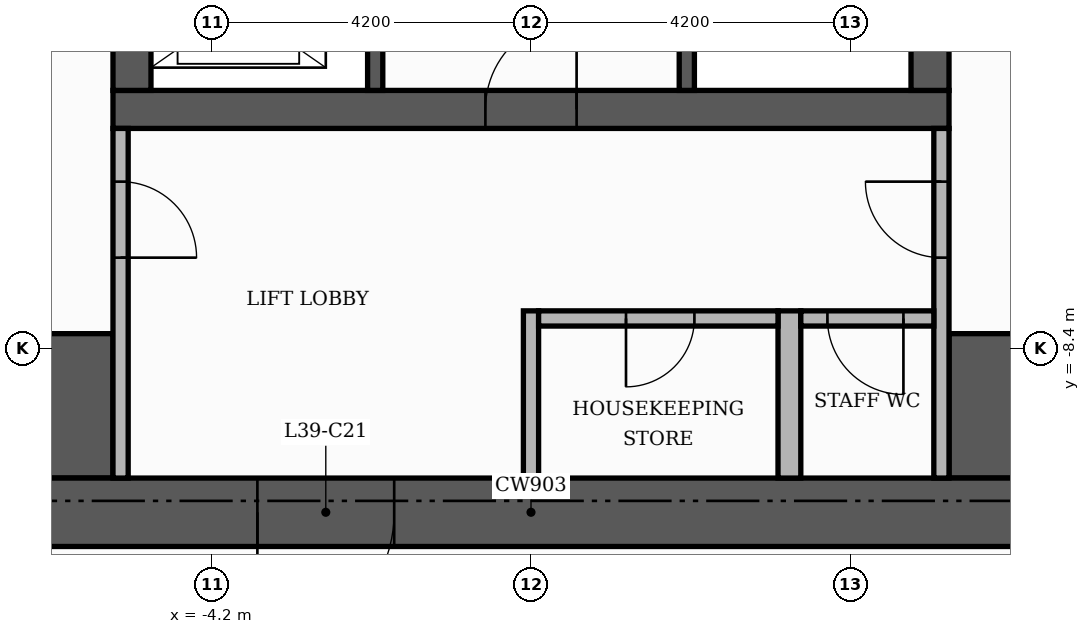
"""IFC4 building model, lengths in metres.
Left out: names, types, materials, properties, quantities, classifications, styles, units other than length and angle.
Written with IfcOpenShell. Run it as: python <this file> out.ifc"""

import sys

from ifc_helpers import new_model, si_unit, direction, frame, frame_2d, origin, place, context, subcontext, project, spatial, rectangle, extrude, element, fill, save


model = new_model("IFC4")
c1 = context("Model", 3, precision=1e-05, world=origin(), true_north=direction((0.0, 1.0)))
c2 = subcontext(c1, "Body", "Model", "MODEL_VIEW")
j1 = project(units=[si_unit("LENGTHUNIT", "METRE"), si_unit("PLANEANGLEUNIT", "RADIAN")], contexts=[c1])
p1 = place(None, origin())
s1 = spatial("IfcSite", under=j1, at=p1, CompositionType="ELEMENT")
p2 = place(p1, origin())
s2 = spatial("IfcBuilding", under=s1, at=p2, CompositionType="ELEMENT")
p3 = place(p2, frame((0.0, 0.0, 165.0)))
s3 = spatial("IfcBuildingStorey", under=s2, at=p3, CompositionType="ELEMENT", Elevation=165.0)
p4 = place(p3, frame((-5.5, -5.25, 0.0), z_axis=(0.0, 0.0, 1.0), x_axis=(1.0, 0.0, 0.0)))
e1 = element("IfcWall", 1, at=p4, inside=s3, PredefinedType="SHEAR", context=c2, shape_type="SweptSolid", body=[
    extrude(rectangle(XDim=11.0, YDim=0.5, at=frame_2d((5.5, 0.0))), origin(), (0.0, 0.0, 1.0), 3.48),
])
p5 = place(p4, frame((4.9, 0.0, 0.0)))
e2 = element("IfcOpeningElement", 2, at=p5, cuts=e1, PredefinedType="OPENING", context=c2, shape_type="SweptSolid", body=[
    extrude(rectangle(XDim=1.2, YDim=2.1, at=frame_2d((0.6, 1.05))), frame((0.0, 0.26, 0.0), z_axis=(0.0, -1.0, 0.0), x_axis=(1.0, 0.0, 0.0)), (0.0, 0.0, 1.0), 0.52),
])
for number, where, z_axis, x_axis in (
    (3, (-5.25, -5.0, 0.0), (0.0, 0.0, 1.0), (0.0, 1.0, 0.0)),
    (4, (5.25, -5.0, 0.0), (0.0, 0.0, 1.0), (0.0, 1.0, 0.0)),
):
    element("IfcWall", number, at=place(p3, frame(where, z_axis=z_axis, x_axis=x_axis)), inside=s3, PredefinedType="SHEAR", context=c2, shape_type="SweptSolid", body=[
        extrude(rectangle(XDim=10.5, YDim=0.5, at=frame_2d((5.25, 0.0))), origin(), (0.0, 0.0, 1.0), 3.48),
    ])
for number, where, z_axis, x_axis in (
    (5, (-10.1, -9.15, 0.0), (0.0, 0.0, 1.0), (1.0, 0.0, 0.0)),
    (6, (5.5, -9.15, 0.0), (0.0, 0.0, 1.0), (1.0, 0.0, 0.0)),
):
    element("IfcWall", number, at=place(p3, frame(where, z_axis=z_axis, x_axis=x_axis)), inside=s3, PredefinedType="SHEAR", context=c2, shape_type="SweptSolid", body=[
        extrude(rectangle(XDim=4.6, YDim=1.9, at=frame_2d((2.3, 0.0))), origin(), (0.0, 0.0, 1.0), 3.48),
    ])
p6 = place(p3, frame((2.05, -5.0, 0.0), z_axis=(0.0, 0.0, 1.0), x_axis=(0.0, 1.0, 0.0)))
e7 = element("IfcWall", 7, at=p6, inside=s3, PredefinedType="SHEAR", context=c2, shape_type="SweptSolid", body=[
    extrude(rectangle(XDim=6.6, YDim=0.2, at=frame_2d((3.3, 0.0))), origin(), (0.0, 0.0, 1.0), 3.48),
])
p7 = place(p6, frame((5.25, 0.0, 0.0)))
e8 = element("IfcOpeningElement", 8, at=p7, cuts=e7, PredefinedType="OPENING", context=c2, shape_type="SweptSolid", body=[
    extrude(rectangle(XDim=1.0, YDim=2.1, at=frame_2d((0.5, 1.05))), frame((0.0, 0.11, 0.0), z_axis=(0.0, -1.0, 0.0), x_axis=(1.0, 0.0, 0.0)), (0.0, 0.0, 1.0), 0.22),
])
p8 = place(p3, frame((-2.05, -5.0, 0.0), z_axis=(0.0, 0.0, 1.0), x_axis=(0.0, 1.0, 0.0)))
e9 = element("IfcWall", 9, at=p8, inside=s3, PredefinedType="SHEAR", context=c2, shape_type="SweptSolid", body=[
    extrude(rectangle(XDim=3.4, YDim=0.2, at=frame_2d((1.7, 0.0))), origin(), (0.0, 0.0, 1.0), 3.48),
])
p9 = place(p8, frame((0.55, 0.0, 0.0)))
e10 = element("IfcOpeningElement", 10, at=p9, cuts=e9, PredefinedType="OPENING", context=c2, shape_type="SweptSolid", body=[
    extrude(rectangle(XDim=1.1, YDim=2.1, at=frame_2d((0.55, 1.05))), frame((0.0, 0.11, 0.0), z_axis=(0.0, -1.0, 0.0), x_axis=(1.0, 0.0, 0.0)), (0.0, 0.0, 1.0), 0.22),
])
p10 = place(p8, frame((2.45, 0.0, 0.0)))
e11 = element("IfcOpeningElement", 11, at=p10, cuts=e9, PredefinedType="OPENING", context=c2, shape_type="SweptSolid", body=[
    extrude(rectangle(XDim=0.8, YDim=2.1, at=frame_2d((0.4, 1.05))), frame((0.0, 0.11, 0.0), z_axis=(0.0, -1.0, 0.0), x_axis=(1.0, 0.0, 0.0)), (0.0, 0.0, 1.0), 0.22),
])
p11 = place(p3, frame((-11.0, -10.55, 0.0), z_axis=(0.0, 0.0, 1.0), x_axis=(1.0, 0.0, 0.0)))
e12 = element("IfcWall", 12, at=p11, inside=s3, PredefinedType="SHEAR", context=c2, shape_type="SweptSolid", body=[
    extrude(rectangle(XDim=22.0, YDim=0.9, at=frame_2d((11.0, 0.0))), origin(), (0.0, 0.0, 1.0), 3.48),
])
p12 = place(p11, frame((7.4, 0.0, 0.0)))
e13 = element("IfcOpeningElement", 13, at=p12, cuts=e12, PredefinedType="OPENING", context=c2, shape_type="SweptSolid", body=[
    extrude(rectangle(XDim=1.8, YDim=2.2, at=frame_2d((0.9, 1.1))), frame((0.0, 0.46, 0.0), z_axis=(0.0, -1.0, 0.0), x_axis=(1.0, 0.0, 0.0)), (0.0, 0.0, 1.0), 0.92),
])
p13 = place(p3, frame((-5.4, -10.1, 0.0), z_axis=(0.0, 0.0, 1.0), x_axis=(0.0, 1.0, 0.0)))
e14 = element("IfcWall", 14, at=p13, inside=s3, PredefinedType="PARTITIONING", context=c2, shape_type="SweptSolid", body=[
    extrude(rectangle(XDim=4.6, YDim=0.2, at=frame_2d((2.3, 0.0))), origin(), (0.0, 0.0, 1.0), 3.48),
])
p14 = place(p13, frame((2.9, 0.0, 0.0)))
e15 = element("IfcOpeningElement", 15, at=p14, cuts=e14, PredefinedType="OPENING", context=c2, shape_type="SweptSolid", body=[
    extrude(rectangle(XDim=1.0, YDim=2.1, at=frame_2d((0.5, 1.05))), frame((0.0, 0.11, 0.0), z_axis=(0.0, -1.0, 0.0), x_axis=(1.0, 0.0, 0.0)), (0.0, 0.0, 1.0), 0.22),
])
p15 = place(p3, frame((0.0, -10.1, 0.0), z_axis=(0.0, 0.0, 1.0), x_axis=(0.0, 1.0, 0.0)))
e16 = element("IfcWall", 16, at=p15, inside=s3, PredefinedType="PARTITIONING", context=c2, shape_type="SweptSolid", body=[
    extrude(rectangle(XDim=2.2, YDim=0.2, at=frame_2d((1.1, 0.0))), origin(), (0.0, 0.0, 1.0), 3.48),
])
p16 = place(p3, frame((3.4, -10.1, 0.0), z_axis=(0.0, 0.0, 1.0), x_axis=(0.0, 1.0, 0.0)))
e17 = element("IfcWall", 17, at=p16, inside=s3, PredefinedType="PARTITIONING", context=c2, shape_type="SweptSolid", body=[
    extrude(rectangle(XDim=2.2, YDim=0.3, at=frame_2d((1.1, 0.0))), origin(), (0.0, 0.0, 1.0), 3.48),
])
p17 = place(p3, frame((5.4, -10.1, 0.0), z_axis=(0.0, 0.0, 1.0), x_axis=(0.0, 1.0, 0.0)))
e18 = element("IfcWall", 18, at=p17, inside=s3, PredefinedType="PARTITIONING", context=c2, shape_type="SweptSolid", body=[
    extrude(rectangle(XDim=4.6, YDim=0.2, at=frame_2d((2.3, 0.0))), origin(), (0.0, 0.0, 1.0), 3.48),
])
p18 = place(p17, frame((2.9, 0.0, 0.0)))
e19 = element("IfcOpeningElement", 19, at=p18, cuts=e18, PredefinedType="OPENING", context=c2, shape_type="SweptSolid", body=[
    extrude(rectangle(XDim=1.0, YDim=2.1, at=frame_2d((0.5, 1.05))), frame((0.0, 0.11, 0.0), z_axis=(0.0, -1.0, 0.0), x_axis=(1.0, 0.0, 0.0)), (0.0, 0.0, 1.0), 0.22),
])
p19 = place(p3, frame((0.1, -8.0, 0.0), z_axis=(0.0, 0.0, 1.0), x_axis=(1.0, 0.0, 0.0)))
e20 = element("IfcWall", 20, at=p19, inside=s3, PredefinedType="PARTITIONING", context=c2, shape_type="SweptSolid", body=[
    extrude(rectangle(XDim=3.15, YDim=0.2, at=frame_2d((1.575, 0.0))), origin(), (0.0, 0.0, 1.0), 3.48),
])
p20 = place(p19, frame((1.15, 0.0, 0.0)))
e21 = element("IfcOpeningElement", 21, at=p20, cuts=e20, PredefinedType="OPENING", context=c2, shape_type="SweptSolid", body=[
    extrude(rectangle(XDim=0.9, YDim=2.1, at=frame_2d((0.45, 1.05))), frame((0.0, 0.11, 0.0), z_axis=(0.0, -1.0, 0.0), x_axis=(1.0, 0.0, 0.0)), (0.0, 0.0, 1.0), 0.22),
])
p21 = place(p3, frame((3.55, -8.0, 0.0), z_axis=(0.0, 0.0, 1.0), x_axis=(1.0, 0.0, 0.0)))
e22 = element("IfcWall", 22, at=p21, inside=s3, PredefinedType="PARTITIONING", context=c2, shape_type="SweptSolid", body=[
    extrude(rectangle(XDim=1.75, YDim=0.2, at=frame_2d((0.875, 0.0))), origin(), (0.0, 0.0, 1.0), 3.48),
])
p22 = place(p21, frame((0.35, 0.0, 0.0)))
e23 = element("IfcOpeningElement", 23, at=p22, cuts=e22, PredefinedType="OPENING", context=c2, shape_type="SweptSolid", body=[
    extrude(rectangle(XDim=1.0, YDim=2.1, at=frame_2d((0.5, 1.05))), frame((0.0, 0.11, 0.0), z_axis=(0.0, -1.0, 0.0), x_axis=(1.0, 0.0, 0.0)), (0.0, 0.0, 1.0), 0.22),
])
p23 = place(p5, origin())
e24 = element("IfcDoor", 24, at=p23, inside=s3, OperationType="SINGLE_SWING_RIGHT", PredefinedType="DOOR", context=c2, shape_type="SweptSolid", body=[
    extrude(rectangle(XDim=1.2, YDim=2.1, at=frame_2d((0.6, 1.05))), frame((0.0, 0.025, 0.0), z_axis=(0.0, -1.0, 0.0), x_axis=(1.0, 0.0, 0.0)), (0.0, 0.0, 1.0), 0.05),
])
fill(e2, e24)
p24 = place(p14, frame((1.0, 0.0, 0.0), z_axis=(0.0, 0.0, 1.0), x_axis=(-1.0, 0.0, 0.0)))
e25 = element("IfcDoor", 25, at=p24, inside=s3, OperationType="SINGLE_SWING_LEFT", PredefinedType="DOOR", context=c2, shape_type="SweptSolid", body=[
    extrude(rectangle(XDim=1.0, YDim=2.1, at=frame_2d((0.5, 1.05))), frame((0.0, 0.025, 0.0), z_axis=(0.0, -1.0, 0.0), x_axis=(1.0, 0.0, 0.0)), (0.0, 0.0, 1.0), 0.05),
])
fill(e15, e25)
p25 = place(p18, origin())
e26 = element("IfcDoor", 26, at=p25, inside=s3, OperationType="SINGLE_SWING_RIGHT", PredefinedType="DOOR", context=c2, shape_type="SweptSolid", body=[
    extrude(rectangle(XDim=1.0, YDim=2.1, at=frame_2d((0.5, 1.05))), frame((0.0, 0.025, 0.0), z_axis=(0.0, -1.0, 0.0), x_axis=(1.0, 0.0, 0.0)), (0.0, 0.0, 1.0), 0.05),
])
fill(e19, e26)
p26 = place(p12, frame((1.8, 0.0, 0.0), z_axis=(0.0, 0.0, 1.0), x_axis=(-1.0, 0.0, 0.0)))
e27 = element("IfcDoor", 27, at=p26, inside=s3, OperationType="DOUBLE_DOOR_SINGLE_SWING", PredefinedType="DOOR", context=c2, shape_type="SweptSolid", body=[
    extrude(rectangle(XDim=1.8, YDim=2.2, at=frame_2d((0.9, 1.1))), frame((0.0, 0.025, 0.0), z_axis=(0.0, -1.0, 0.0), x_axis=(1.0, 0.0, 0.0)), (0.0, 0.0, 1.0), 0.05),
])
fill(e13, e27)
p27 = place(p20, frame((0.9, 0.0, 0.0), z_axis=(0.0, 0.0, 1.0), x_axis=(-1.0, 0.0, 0.0)))
e28 = element("IfcDoor", 28, at=p27, inside=s3, OperationType="SINGLE_SWING_LEFT", PredefinedType="DOOR", context=c2, shape_type="SweptSolid", body=[
    extrude(rectangle(XDim=0.9, YDim=2.1, at=frame_2d((0.45, 1.05))), frame((0.0, 0.025, 0.0), z_axis=(0.0, -1.0, 0.0), x_axis=(1.0, 0.0, 0.0)), (0.0, 0.0, 1.0), 0.05),
])
fill(e21, e28)
p28 = place(p22, frame((1.0, 0.0, 0.0), z_axis=(0.0, 0.0, 1.0), x_axis=(-1.0, 0.0, 0.0)))
e29 = element("IfcDoor", 29, at=p28, inside=s3, OperationType="SINGLE_SWING_RIGHT", PredefinedType="DOOR", context=c2, shape_type="SweptSolid", body=[
    extrude(rectangle(XDim=1.0, YDim=2.1, at=frame_2d((0.5, 1.05))), frame((0.0, 0.025, 0.0), z_axis=(0.0, -1.0, 0.0), x_axis=(1.0, 0.0, 0.0)), (0.0, 0.0, 1.0), 0.05),
])
fill(e23, e29)
save(model, sys.argv[1])
